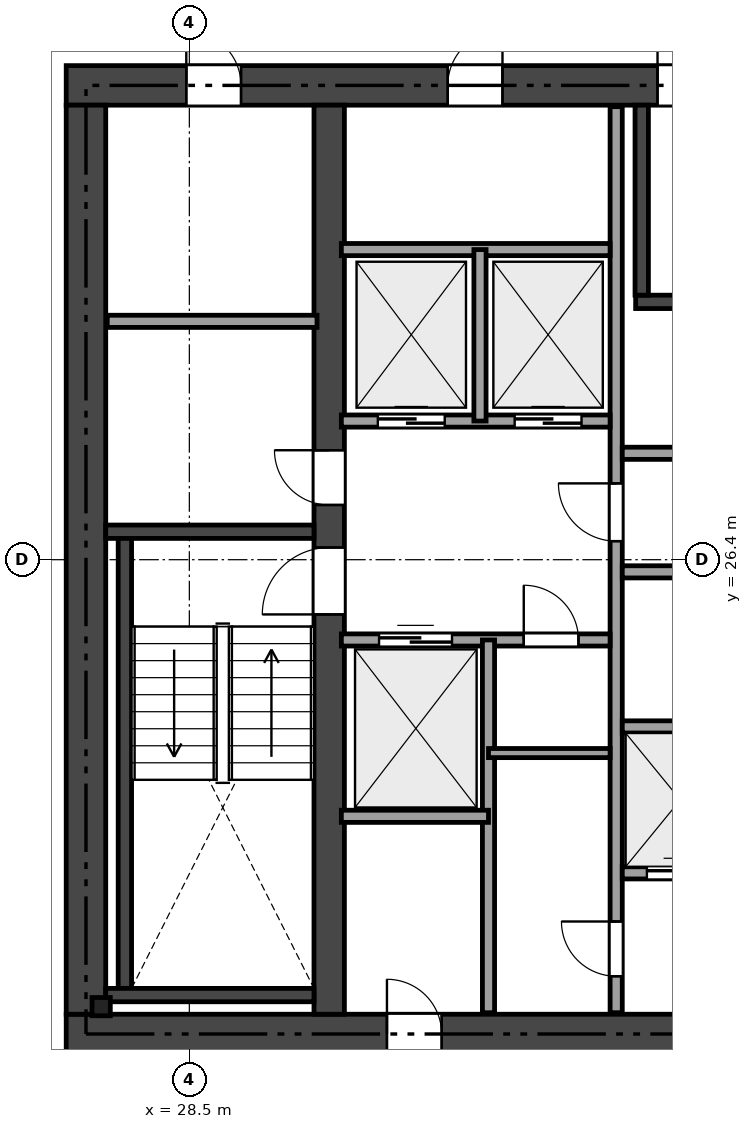
"""IFC4 building model, lengths in metres.
Left out: names, types, materials, properties, quantities, classifications, styles, units other than length and angle.
Written with IfcOpenShell. Run it as: python <this file> out.ifc"""

import sys

from ifc_helpers import new_model, si_unit, direction, frame, frame_2d, origin, origin_2d, place, context, subcontext, project, spatial, rectangle, i_section, extrude, element, fill, save


model = new_model("IFC4")
c1 = context("Model", 3, precision=1e-05, world=origin(), true_north=direction((0.0, 1.0)))
c2 = subcontext(c1, "Body", "Model", "MODEL_VIEW")
j1 = project(units=[si_unit("LENGTHUNIT", "METRE"), si_unit("PLANEANGLEUNIT", "RADIAN")], contexts=[c1])
p1 = place(None, origin())
s1 = spatial("IfcSite", under=j1, at=p1, CompositionType="ELEMENT")
p2 = place(p1, origin())
s2 = spatial("IfcBuilding", under=s1, at=p2, CompositionType="ELEMENT")
p3 = place(p2, frame((0.0, 0.0, 51.15)))
s3 = spatial("IfcBuildingStorey", under=s2, at=p3, CompositionType="ELEMENT", Elevation=51.15)
p4 = place(p3, frame((26.475, 18.6, 0.0), z_axis=(0.0, 0.0, 1.0), x_axis=(1.0, 0.0, 0.0)))
e1 = element("IfcWall", 1, at=p4, inside=s3, PredefinedType="SHEAR", context=c2, shape_type="SweptSolid", body=[
    extrude(rectangle(XDim=21.45, YDim=0.65, at=frame_2d((10.725, 0.0))), origin(), (0.0, 0.0, 1.0), 3.17),
])
p5 = place(p4, frame((12.45, 0.0, 0.0)))
e2 = element("IfcOpeningElement", 2, at=p5, cuts=e1, PredefinedType="OPENING", context=c2, shape_type="SweptSolid", body=[
    extrude(rectangle(XDim=1.15, YDim=2.15, at=frame_2d((0.575, 1.075))), frame((0.0, 0.335, 0.0), z_axis=(0.0, -1.0, 0.0), x_axis=(1.0, 0.0, 0.0)), (0.0, 0.0, 1.0), 0.67),
])
p6 = place(p4, frame((5.275, 0.0, 0.0)))
e3 = element("IfcOpeningElement", 3, at=p6, cuts=e1, PredefinedType="OPENING", context=c2, shape_type="SweptSolid", body=[
    extrude(rectangle(XDim=0.9, YDim=2.1, at=frame_2d((0.45, 1.05))), frame((0.0, 0.335, 0.0), z_axis=(0.0, -1.0, 0.0), x_axis=(1.0, 0.0, 0.0)), (0.0, 0.0, 1.0), 0.67),
])
p7 = place(p3, frame((26.475, 34.2, 0.0), z_axis=(0.0, 0.0, 1.0), x_axis=(1.0, 0.0, 0.0)))
e4 = element("IfcWall", 4, at=p7, inside=s3, PredefinedType="SHEAR", context=c2, shape_type="SweptSolid", body=[
    extrude(rectangle(XDim=21.45, YDim=0.65, at=frame_2d((10.725, 0.0))), origin(), (0.0, 0.0, 1.0), 3.17),
])
p8 = place(p7, frame((9.725, 0.0, 0.0)))
e5 = element("IfcOpeningElement", 5, at=p8, cuts=e4, PredefinedType="OPENING", context=c2, shape_type="SweptSolid", body=[
    extrude(rectangle(XDim=1.1, YDim=2.15, at=frame_2d((0.55, 1.075))), frame((0.0, 0.335, 0.0), z_axis=(0.0, -1.0, 0.0), x_axis=(1.0, 0.0, 0.0)), (0.0, 0.0, 1.0), 0.67),
])
p9 = place(p7, frame((1.975, 0.0, 0.0)))
e6 = element("IfcOpeningElement", 6, at=p9, cuts=e4, PredefinedType="OPENING", context=c2, shape_type="SweptSolid", body=[
    extrude(rectangle(XDim=0.9, YDim=2.1, at=frame_2d((0.45, 1.05))), frame((0.0, 0.335, 0.0), z_axis=(0.0, -1.0, 0.0), x_axis=(1.0, 0.0, 0.0)), (0.0, 0.0, 1.0), 0.67),
])
p10 = place(p7, frame((6.275, 0.0, 0.0)))
e7 = element("IfcOpeningElement", 7, at=p10, cuts=e4, PredefinedType="OPENING", context=c2, shape_type="SweptSolid", body=[
    extrude(rectangle(XDim=0.9, YDim=2.1, at=frame_2d((0.45, 1.05))), frame((0.0, 0.335, 0.0), z_axis=(0.0, -1.0, 0.0), x_axis=(1.0, 0.0, 0.0)), (0.0, 0.0, 1.0), 0.67),
])
p11 = place(p3, frame((26.8, 18.925, 0.0), z_axis=(0.0, 0.0, 1.0), x_axis=(0.0, 1.0, 0.0)))
e8 = element("IfcWall", 8, at=p11, inside=s3, PredefinedType="SHEAR", context=c2, shape_type="SweptSolid", body=[
    extrude(rectangle(XDim=14.95, YDim=0.65, at=frame_2d((7.475, 0.0))), origin(), (0.0, 0.0, 1.0), 3.17),
])
p12 = place(p3, frame((30.8, 18.925, 0.0), z_axis=(0.0, 0.0, 1.0), x_axis=(0.0, 1.0, 0.0)))
e9 = element("IfcWall", 9, at=p12, inside=s3, PredefinedType="SHEAR", context=c2, shape_type="SweptSolid", body=[
    extrude(rectangle(XDim=14.95, YDim=0.5, at=frame_2d((7.475, 0.0))), origin(), (0.0, 0.0, 1.0), 3.17),
])
p13 = place(p12, frame((6.575, 0.0, 0.0)))
e10 = element("IfcOpeningElement", 10, at=p13, cuts=e9, PredefinedType="OPENING", context=c2, shape_type="SweptSolid", body=[
    extrude(rectangle(XDim=1.1, YDim=2.15, at=frame_2d((0.55, 1.075))), frame((0.0, 0.26, 0.0), z_axis=(0.0, -1.0, 0.0), x_axis=(1.0, 0.0, 0.0)), (0.0, 0.0, 1.0), 0.52),
])
p14 = place(p12, frame((8.375, 0.0, 0.0)))
e11 = element("IfcOpeningElement", 11, at=p14, cuts=e9, PredefinedType="OPENING", context=c2, shape_type="SweptSolid", body=[
    extrude(rectangle(XDim=0.9, YDim=2.1, at=frame_2d((0.45, 1.05))), frame((0.0, 0.26, 0.0), z_axis=(0.0, -1.0, 0.0), x_axis=(1.0, 0.0, 0.0)), (0.0, 0.0, 1.0), 0.52),
])
p15 = place(p3, frame((27.125, 26.86, 0.0), z_axis=(0.0, 0.0, 1.0), x_axis=(1.0, 0.0, 0.0)))
e12 = element("IfcWall", 12, at=p15, inside=s3, PredefinedType="SHEAR", context=c2, shape_type="SweptSolid", body=[
    extrude(rectangle(XDim=3.425, YDim=0.22, at=frame_2d((1.712, 0.0))), origin(), (0.0, 0.0, 1.0), 3.17),
])
p16 = place(p3, frame((27.44, 19.35, 0.0), z_axis=(0.0, 0.0, 1.0), x_axis=(0.0, 1.0, 0.0)))
e13 = element("IfcWall", 13, at=p16, inside=s3, PredefinedType="SHEAR", context=c2, shape_type="SweptSolid", body=[
    extrude(rectangle(XDim=7.4, YDim=0.22, at=frame_2d((3.7, 0.0))), origin(), (0.0, 0.0, 1.0), 3.17),
])
p17 = place(p3, frame((27.125, 19.24, 0.0), z_axis=(0.0, 0.0, 1.0), x_axis=(1.0, 0.0, 0.0)))
e14 = element("IfcWall", 14, at=p17, inside=s3, PredefinedType="SHEAR", context=c2, shape_type="SweptSolid", body=[
    extrude(rectangle(XDim=3.425, YDim=0.22, at=frame_2d((1.712, 0.0))), origin(), (0.0, 0.0, 1.0), 3.17),
])
p18 = place(p3, frame((35.84, 30.64, 0.0), z_axis=(0.0, 0.0, 1.0), x_axis=(1.0, 0.0, 0.0)))
e15 = element("IfcWall", 15, at=p18, inside=s3, PredefinedType="SHEAR", context=c2, shape_type="SweptSolid", body=[
    extrude(rectangle(XDim=7.61, YDim=0.22, at=frame_2d((3.805, 0.0))), origin(), (0.0, 0.0, 1.0), 3.17),
])
p19 = place(p3, frame((35.94, 30.75, 0.0), z_axis=(0.0, 0.0, 1.0), x_axis=(0.0, 1.0, 0.0)))
e16 = element("IfcWall", 16, at=p19, inside=s3, PredefinedType="SHEAR", context=c2, shape_type="SweptSolid", body=[
    extrude(rectangle(XDim=3.125, YDim=0.22, at=frame_2d((1.562, 0.0))), origin(), (0.0, 0.0, 1.0), 3.17),
])
p20 = place(p3, frame((27.05, 19.05, 0.0), z_axis=(0.0, 0.0, 1.0), x_axis=(1.0, 0.0, 0.0)))
e17 = element("IfcColumn", 17, at=p20, inside=s3, PredefinedType="PILASTER", context=c2, shape_type="SweptSolid", body=[
    extrude(i_section(OverallWidth=0.3, OverallDepth=0.3, WebThickness=0.011, FlangeThickness=0.019, at=origin_2d()), origin(), (0.0, 0.0, 1.0), 3.17),
])
p21 = place(p3, frame((27.15, 30.32, 0.0), z_axis=(0.0, 0.0, 1.0), x_axis=(1.0, 0.0, 0.0)))
e18 = element("IfcWall", 18, at=p21, inside=s3, PredefinedType="SOLIDWALL", context=c2, shape_type="SweptSolid", body=[
    extrude(rectangle(XDim=3.45, YDim=0.2, at=frame_2d((1.725, 0.0))), origin(), (0.0, 0.0, 1.0), 3.17),
])
p22 = place(p3, frame((35.52, 18.95, 0.0), z_axis=(0.0, 0.0, 1.0), x_axis=(0.0, 1.0, 0.0)))
e19 = element("IfcWall", 19, at=p22, inside=s3, PredefinedType="SOLIDWALL", context=c2, shape_type="SweptSolid", body=[
    extrude(rectangle(XDim=14.9, YDim=0.2, at=frame_2d((7.45, 0.0))), origin(), (0.0, 0.0, 1.0), 2.691),
])
p23 = place(p22, frame((7.755, 0.0, 0.0)))
e20 = element("IfcOpeningElement", 20, at=p23, cuts=e19, PredefinedType="OPENING", context=c2, shape_type="SweptSolid", body=[
    extrude(rectangle(XDim=0.95, YDim=2.15, at=frame_2d((0.475, 1.075))), frame((0.0, 0.11, 0.0), z_axis=(0.0, -1.0, 0.0), x_axis=(1.0, 0.0, 0.0)), (0.0, 0.0, 1.0), 0.22),
])
p24 = place(p22, frame((0.6, 0.0, 0.0)))
e21 = element("IfcOpeningElement", 21, at=p24, cuts=e19, PredefinedType="OPENING", context=c2, shape_type="SweptSolid", body=[
    extrude(rectangle(XDim=0.9, YDim=2.1, at=frame_2d((0.45, 1.05))), frame((0.0, 0.11, 0.0), z_axis=(0.0, -1.0, 0.0), x_axis=(1.0, 0.0, 0.0)), (0.0, 0.0, 1.0), 0.22),
])
p25 = place(p3, frame((31.0, 28.68, 0.0), z_axis=(0.0, 0.0, 1.0), x_axis=(1.0, 0.0, 0.0)))
e22 = element("IfcWall", 22, at=p25, inside=s3, PredefinedType="SOLIDWALL", context=c2, shape_type="SweptSolid", body=[
    extrude(rectangle(XDim=4.42, YDim=0.2, at=frame_2d((2.21, 0.0))), origin(), (0.0, 0.0, 1.0), 3.17),
])
p26 = place(p25, frame((0.6, 0.0, 0.0)))
e23 = element("IfcOpeningElement", 23, at=p26, cuts=e22, PredefinedType="OPENING", context=c2, shape_type="SweptSolid", body=[
    extrude(rectangle(XDim=1.1, YDim=2.15, at=frame_2d((0.55, 1.075))), frame((0.0, 0.11, 0.0), z_axis=(0.0, -1.0, 0.0), x_axis=(1.0, 0.0, 0.0)), (0.0, 0.0, 1.0), 0.22),
])
p27 = place(p25, frame((2.85, 0.0, 0.0)))
e24 = element("IfcOpeningElement", 24, at=p27, cuts=e22, PredefinedType="OPENING", context=c2, shape_type="SweptSolid", body=[
    extrude(rectangle(XDim=1.1, YDim=2.15, at=frame_2d((0.55, 1.075))), frame((0.0, 0.11, 0.0), z_axis=(0.0, -1.0, 0.0), x_axis=(1.0, 0.0, 0.0)), (0.0, 0.0, 1.0), 0.22),
])
p28 = place(p3, frame((31.0, 31.5, 0.0), z_axis=(0.0, 0.0, 1.0), x_axis=(1.0, 0.0, 0.0)))
e25 = element("IfcWall", 25, at=p28, inside=s3, PredefinedType="SOLIDWALL", context=c2, shape_type="SweptSolid", body=[
    extrude(rectangle(XDim=4.42, YDim=0.2, at=frame_2d((2.21, 0.0))), origin(), (0.0, 0.0, 1.0), 3.17),
])
p29 = place(p3, frame((33.28, 28.68, 0.0), z_axis=(0.0, 0.0, 1.0), x_axis=(0.0, 1.0, 0.0)))
e26 = element("IfcWall", 26, at=p29, inside=s3, PredefinedType="SOLIDWALL", context=c2, shape_type="SweptSolid", body=[
    extrude(rectangle(XDim=2.82, YDim=0.2, at=frame_2d((1.41, 0.0))), origin(), (0.0, 0.0, 1.0), 3.17),
])
p30 = place(p3, frame((31.0, 25.08, 0.0), z_axis=(0.0, 0.0, 1.0), x_axis=(1.0, 0.0, 0.0)))
e27 = element("IfcWall", 27, at=p30, inside=s3, PredefinedType="SOLIDWALL", context=c2, shape_type="SweptSolid", body=[
    extrude(rectangle(XDim=4.42, YDim=0.2, at=frame_2d((2.21, 0.0))), origin(), (0.0, 0.0, 1.0), 3.17),
])
p31 = place(p30, frame((3.0, 0.0, 0.0)))
e28 = element("IfcOpeningElement", 28, at=p31, cuts=e27, PredefinedType="OPENING", context=c2, shape_type="SweptSolid", body=[
    extrude(rectangle(XDim=0.9, YDim=2.1, at=frame_2d((0.45, 1.05))), frame((0.0, 0.11, 0.0), z_axis=(0.0, -1.0, 0.0), x_axis=(1.0, 0.0, 0.0)), (0.0, 0.0, 1.0), 0.22),
])
p32 = place(p30, frame((0.62, 0.0, 0.0)))
e29 = element("IfcOpeningElement", 29, at=p32, cuts=e27, PredefinedType="OPENING", context=c2, shape_type="SweptSolid", body=[
    extrude(rectangle(XDim=1.2, YDim=2.15, at=frame_2d((0.6, 1.075))), frame((0.0, 0.11, 0.0), z_axis=(0.0, -1.0, 0.0), x_axis=(1.0, 0.0, 0.0)), (0.0, 0.0, 1.0), 0.22),
])
p33 = place(p3, frame((33.42, 18.95, 0.0), z_axis=(0.0, 0.0, 1.0), x_axis=(0.0, 1.0, 0.0)))
e30 = element("IfcWall", 30, at=p33, inside=s3, PredefinedType="SOLIDWALL", context=c2, shape_type="SweptSolid", body=[
    extrude(rectangle(XDim=6.13, YDim=0.2, at=frame_2d((3.065, 0.0))), origin(), (0.0, 0.0, 1.0), 2.691),
])
p34 = place(p3, frame((31.0, 22.18, 0.0), z_axis=(0.0, 0.0, 1.0), x_axis=(1.0, 0.0, 0.0)))
e31 = element("IfcWall", 31, at=p34, inside=s3, PredefinedType="SOLIDWALL", context=c2, shape_type="SweptSolid", body=[
    extrude(rectangle(XDim=2.42, YDim=0.2, at=frame_2d((1.21, 0.0))), origin(), (0.0, 0.0, 1.0), 3.17),
])
p35 = place(p3, frame((33.42, 23.22, 0.0), z_axis=(0.0, 0.0, 1.0), x_axis=(1.0, 0.0, 0.0)))
e32 = element("IfcWall", 32, at=p35, inside=s3, PredefinedType="PARTITIONING", context=c2, shape_type="SweptSolid", body=[
    extrude(rectangle(XDim=2.0, YDim=0.15, at=frame_2d((1.0, 0.0))), origin(), (0.0, 0.0, 1.0), 3.17),
])
for number, where, z_axis, x_axis in (
    (33, (35.62, 28.15, 0.0), (0.0, 0.0, 1.0), (1.0, 0.0, 0.0)),
    (34, (35.62, 26.2, 0.0), (0.0, 0.0, 1.0), (1.0, 0.0, 0.0)),
):
    element("IfcWall", number, at=place(p3, frame(where, z_axis=z_axis, x_axis=x_axis)), inside=s3, PredefinedType="SOLIDWALL", context=c2, shape_type="SweptSolid", body=[
        extrude(rectangle(XDim=7.88, YDim=0.2, at=frame_2d((3.94, 0.0))), origin(), (0.0, 0.0, 1.0), 3.17),
    ])
p36 = place(p3, frame((35.62, 23.65, 0.0), z_axis=(0.0, 0.0, 1.0), x_axis=(1.0, 0.0, 0.0)))
e35 = element("IfcWall", 35, at=p36, inside=s3, PredefinedType="SOLIDWALL", context=c2, shape_type="SweptSolid", body=[
    extrude(rectangle(XDim=7.88, YDim=0.2, at=frame_2d((3.94, 0.0))), origin(), (0.0, 0.0, 1.0), 2.691),
])
p37 = place(p3, frame((35.62, 21.25, 0.0), z_axis=(0.0, 0.0, 1.0), x_axis=(1.0, 0.0, 0.0)))
e36 = element("IfcWall", 36, at=p37, inside=s3, PredefinedType="SOLIDWALL", context=c2, shape_type="SweptSolid", body=[
    extrude(rectangle(XDim=7.88, YDim=0.2, at=frame_2d((3.94, 0.0))), origin(), (0.0, 0.0, 1.0), 3.17),
])
p38 = place(p37, frame((0.405, 0.0, 0.0)))
e37 = element("IfcOpeningElement", 37, at=p38, cuts=e36, PredefinedType="OPENING", context=c2, shape_type="SweptSolid", body=[
    extrude(rectangle(XDim=1.1, YDim=2.15, at=frame_2d((0.55, 1.075))), frame((0.0, 0.11, 0.0), z_axis=(0.0, -1.0, 0.0), x_axis=(1.0, 0.0, 0.0)), (0.0, 0.0, 1.0), 0.22),
])
p39 = place(p37, frame((2.355, 0.0, 0.0)))
e38 = element("IfcOpeningElement", 38, at=p39, cuts=e36, PredefinedType="OPENING", context=c2, shape_type="SweptSolid", body=[
    extrude(rectangle(XDim=1.1, YDim=2.15, at=frame_2d((0.55, 1.075))), frame((0.0, 0.11, 0.0), z_axis=(0.0, -1.0, 0.0), x_axis=(1.0, 0.0, 0.0)), (0.0, 0.0, 1.0), 0.22),
])
p40 = place(p37, frame((4.305, 0.0, 0.0)))
e39 = element("IfcOpeningElement", 39, at=p40, cuts=e36, PredefinedType="OPENING", context=c2, shape_type="SweptSolid", body=[
    extrude(rectangle(XDim=1.1, YDim=2.15, at=frame_2d((0.55, 1.075))), frame((0.0, 0.11, 0.0), z_axis=(0.0, -1.0, 0.0), x_axis=(1.0, 0.0, 0.0)), (0.0, 0.0, 1.0), 0.22),
])
p41 = place(p37, frame((6.255, 0.0, 0.0)))
e40 = element("IfcOpeningElement", 40, at=p41, cuts=e36, PredefinedType="OPENING", context=c2, shape_type="SweptSolid", body=[
    extrude(rectangle(XDim=1.1, YDim=2.15, at=frame_2d((0.55, 1.075))), frame((0.0, 0.11, 0.0), z_axis=(0.0, -1.0, 0.0), x_axis=(1.0, 0.0, 0.0)), (0.0, 0.0, 1.0), 0.22),
])
p42 = place(p13, origin())
e41 = element("IfcDoor", 41, at=p42, inside=s3, OperationType="SINGLE_SWING_LEFT", PredefinedType="DOOR", context=c2, shape_type="SweptSolid", body=[
    extrude(rectangle(XDim=1.1, YDim=2.15, at=frame_2d((0.55, 1.075))), frame((0.0, 0.025, 0.0), z_axis=(0.0, -1.0, 0.0), x_axis=(1.0, 0.0, 0.0)), (0.0, 0.0, 1.0), 0.05),
])
fill(e10, e41)
p43 = place(p8, origin())
e42 = element("IfcDoor", 42, at=p43, inside=s3, OperationType="SINGLE_SWING_LEFT", PredefinedType="DOOR", context=c2, shape_type="SweptSolid", body=[
    extrude(rectangle(XDim=1.1, YDim=2.15, at=frame_2d((0.55, 1.075))), frame((0.0, 0.025, 0.0), z_axis=(0.0, -1.0, 0.0), x_axis=(1.0, 0.0, 0.0)), (0.0, 0.0, 1.0), 0.05),
])
fill(e5, e42)
p44 = place(p23, origin())
e43 = element("IfcDoor", 43, at=p44, inside=s3, OperationType="SINGLE_SWING_RIGHT", PredefinedType="DOOR", context=c2, shape_type="SweptSolid", body=[
    extrude(rectangle(XDim=0.95, YDim=2.15, at=frame_2d((0.475, 1.075))), frame((0.0, 0.025, 0.0), z_axis=(0.0, -1.0, 0.0), x_axis=(1.0, 0.0, 0.0)), (0.0, 0.0, 1.0), 0.05),
])
fill(e20, e43)
p45 = place(p14, origin())
e44 = element("IfcDoor", 44, at=p45, inside=s3, OperationType="SINGLE_SWING_RIGHT", PredefinedType="DOOR", context=c2, shape_type="SweptSolid", body=[
    extrude(rectangle(XDim=0.9, YDim=2.1, at=frame_2d((0.45, 1.05))), frame((0.0, 0.025, 0.0), z_axis=(0.0, -1.0, 0.0), x_axis=(1.0, 0.0, 0.0)), (0.0, 0.0, 1.0), 0.05),
])
fill(e11, e44)
p46 = place(p9, origin())
e45 = element("IfcDoor", 45, at=p46, inside=s3, OperationType="SINGLE_SWING_LEFT", PredefinedType="DOOR", context=c2, shape_type="SweptSolid", body=[
    extrude(rectangle(XDim=0.9, YDim=2.1, at=frame_2d((0.45, 1.05))), frame((0.0, 0.025, 0.0), z_axis=(0.0, -1.0, 0.0), x_axis=(1.0, 0.0, 0.0)), (0.0, 0.0, 1.0), 0.05),
])
fill(e6, e45)
p47 = place(p10, origin())
e46 = element("IfcDoor", 46, at=p47, inside=s3, OperationType="SINGLE_SWING_RIGHT", PredefinedType="DOOR", context=c2, shape_type="SweptSolid", body=[
    extrude(rectangle(XDim=0.9, YDim=2.1, at=frame_2d((0.45, 1.05))), frame((0.0, 0.025, 0.0), z_axis=(0.0, -1.0, 0.0), x_axis=(1.0, 0.0, 0.0)), (0.0, 0.0, 1.0), 0.05),
])
fill(e7, e46)
p48 = place(p6, origin())
e47 = element("IfcDoor", 47, at=p48, inside=s3, OperationType="SINGLE_SWING_LEFT", PredefinedType="DOOR", context=c2, shape_type="SweptSolid", body=[
    extrude(rectangle(XDim=0.9, YDim=2.1, at=frame_2d((0.45, 1.05))), frame((0.0, 0.025, 0.0), z_axis=(0.0, -1.0, 0.0), x_axis=(1.0, 0.0, 0.0)), (0.0, 0.0, 1.0), 0.05),
])
fill(e3, e47)
p49 = place(p24, origin())
e48 = element("IfcDoor", 48, at=p49, inside=s3, OperationType="SINGLE_SWING_RIGHT", PredefinedType="DOOR", context=c2, shape_type="SweptSolid", body=[
    extrude(rectangle(XDim=0.9, YDim=2.1, at=frame_2d((0.45, 1.05))), frame((0.0, 0.025, 0.0), z_axis=(0.0, -1.0, 0.0), x_axis=(1.0, 0.0, 0.0)), (0.0, 0.0, 1.0), 0.05),
])
fill(e21, e48)
p50 = place(p31, origin())
e49 = element("IfcDoor", 49, at=p50, inside=s3, OperationType="SINGLE_SWING_LEFT", PredefinedType="DOOR", context=c2, shape_type="SweptSolid", body=[
    extrude(rectangle(XDim=0.9, YDim=2.1, at=frame_2d((0.45, 1.05))), frame((0.0, 0.025, 0.0), z_axis=(0.0, -1.0, 0.0), x_axis=(1.0, 0.0, 0.0)), (0.0, 0.0, 1.0), 0.05),
])
fill(e28, e49)
p51 = place(p26, origin())
e50 = element("IfcDoor", 50, at=p51, inside=s3, OperationType="SLIDING_TO_LEFT", PredefinedType="DOOR", context=c2, shape_type="SweptSolid", body=[
    extrude(rectangle(XDim=1.1, YDim=2.15, at=frame_2d((0.55, 1.075))), frame((0.0, 0.025, 0.0), z_axis=(0.0, -1.0, 0.0), x_axis=(1.0, 0.0, 0.0)), (0.0, 0.0, 1.0), 0.05),
])
fill(e23, e50)
p52 = place(p27, origin())
e51 = element("IfcDoor", 51, at=p52, inside=s3, OperationType="SLIDING_TO_LEFT", PredefinedType="DOOR", context=c2, shape_type="SweptSolid", body=[
    extrude(rectangle(XDim=1.1, YDim=2.15, at=frame_2d((0.55, 1.075))), frame((0.0, 0.025, 0.0), z_axis=(0.0, -1.0, 0.0), x_axis=(1.0, 0.0, 0.0)), (0.0, 0.0, 1.0), 0.05),
])
fill(e24, e51)
p53 = place(p32, origin())
e52 = element("IfcDoor", 52, at=p53, inside=s3, OperationType="SLIDING_TO_LEFT", PredefinedType="DOOR", context=c2, shape_type="SweptSolid", body=[
    extrude(rectangle(XDim=1.2, YDim=2.15, at=frame_2d((0.6, 1.075))), frame((0.0, 0.025, 0.0), z_axis=(0.0, -1.0, 0.0), x_axis=(1.0, 0.0, 0.0)), (0.0, 0.0, 1.0), 0.05),
])
fill(e29, e52)
p54 = place(p38, origin())
e53 = element("IfcDoor", 53, at=p54, inside=s3, OperationType="SLIDING_TO_LEFT", PredefinedType="DOOR", context=c2, shape_type="SweptSolid", body=[
    extrude(rectangle(XDim=1.1, YDim=2.15, at=frame_2d((0.55, 1.075))), frame((0.0, 0.025, 0.0), z_axis=(0.0, -1.0, 0.0), x_axis=(1.0, 0.0, 0.0)), (0.0, 0.0, 1.0), 0.05),
])
fill(e37, e53)
save(model, sys.argv[1])
